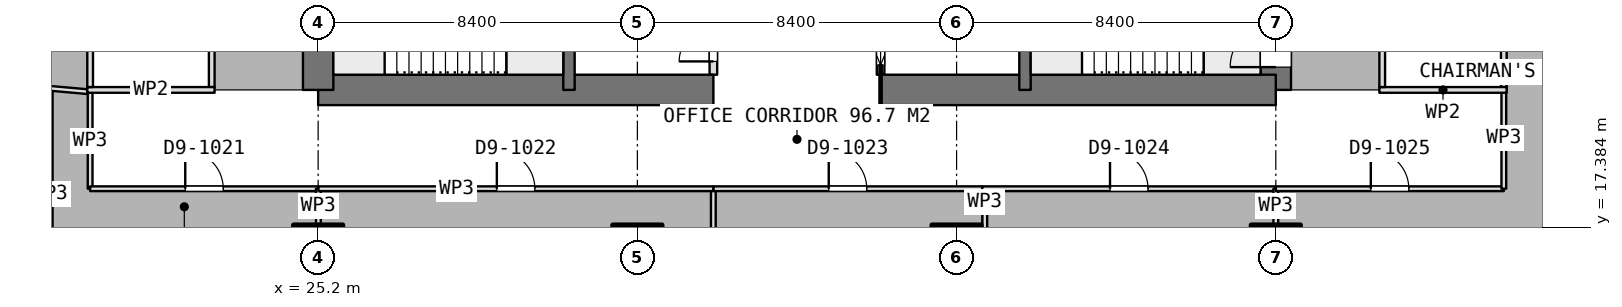
"""IFC4 building model, lengths in metres.
Left out: names, types, materials, properties, quantities, classifications, styles, units other than length and angle.
Written with IfcOpenShell. Run it as: python <this file> out.ifc"""

import sys

from ifc_helpers import new_model, si_unit, direction, frame, frame_2d, origin, origin_2d, place, context, subcontext, project, spatial, rectangle, extrude, element, fill, save


model = new_model("IFC4")
c1 = context("Model", 3, precision=1e-05, world=origin(), true_north=direction((0.0, 1.0)))
c2 = subcontext(c1, "Body", "Model", "MODEL_VIEW")
j1 = project(units=[si_unit("LENGTHUNIT", "METRE"), si_unit("PLANEANGLEUNIT", "RADIAN")], contexts=[c1])
p1 = place(None, origin())
s1 = spatial("IfcSite", under=j1, at=p1, CompositionType="ELEMENT")
p2 = place(p1, origin())
s2 = spatial("IfcBuilding", under=s1, at=p2, CompositionType="ELEMENT")
p3 = place(p2, frame((0.0, 0.0, 276.35)))
s3 = spatial("IfcBuildingStorey", under=s2, at=p3, CompositionType="ELEMENT", Elevation=276.35)
p4 = place(p3, frame((25.2, 21.0, 0.0), z_axis=(0.0, 0.0, 1.0), x_axis=(1.0, 0.0, 0.0)))
e1 = element("IfcWall", 1, at=p4, inside=s3, PredefinedType="SHEAR", context=c2, shape_type="SweptSolid", body=[
    extrude(rectangle(XDim=10.4, YDim=0.8, at=frame_2d((5.2, 0.0))), origin(), (0.0, 0.0, 1.0), 3.75),
])
p5 = place(p3, frame((40.0, 21.0, 0.0), z_axis=(0.0, 0.0, 1.0), x_axis=(1.0, 0.0, 0.0)))
e2 = element("IfcWall", 2, at=p5, inside=s3, PredefinedType="SHEAR", context=c2, shape_type="SweptSolid", body=[
    extrude(rectangle(XDim=10.4, YDim=0.8, at=frame_2d((5.2, 0.0))), origin(), (0.0, 0.0, 1.0), 3.75),
])
p6 = place(p3, frame((25.2, 21.0, 0.0), z_axis=(0.0, 0.0, 1.0), x_axis=(0.0, 1.0, 0.0)))
e3 = element("IfcWall", 3, at=p6, inside=s3, PredefinedType="SHEAR", context=c2, shape_type="SweptSolid", body=[
    extrude(rectangle(XDim=25.2, YDim=0.8, at=frame_2d((12.6, 0.0))), origin(), (0.0, 0.0, 1.0), 3.75),
])
p7 = place(p6, frame((7.8, 0.0, 0.0)))
e4 = element("IfcOpeningElement", 4, at=p7, cuts=e3, PredefinedType="OPENING", context=c2, shape_type="SweptSolid", body=[
    extrude(rectangle(XDim=1.2, YDim=2.1, at=frame_2d((0.6, 1.05))), frame((0.0, 0.41, 0.0), z_axis=(0.0, -1.0, 0.0), x_axis=(1.0, 0.0, 0.0)), (0.0, 0.0, 1.0), 0.82),
])
p8 = place(p6, frame((14.25, 0.0, 0.0)))
e5 = element("IfcOpeningElement", 5, at=p8, cuts=e3, PredefinedType="OPENING", context=c2, shape_type="SweptSolid", body=[
    extrude(rectangle(XDim=0.9, YDim=2.1, at=frame_2d((0.45, 1.05))), frame((0.0, 0.41, 0.0), z_axis=(0.0, -1.0, 0.0), x_axis=(1.0, 0.0, 0.0)), (0.0, 0.0, 1.0), 0.82),
])
p9 = place(p6, frame((16.85, 0.0, 0.0)))
e6 = element("IfcOpeningElement", 6, at=p9, cuts=e3, PredefinedType="OPENING", context=c2, shape_type="SweptSolid", body=[
    extrude(rectangle(XDim=0.9, YDim=2.1, at=frame_2d((0.45, 1.05))), frame((0.0, 0.41, 0.0), z_axis=(0.0, -1.0, 0.0), x_axis=(1.0, 0.0, 0.0)), (0.0, 0.0, 1.0), 0.82),
])
p10 = place(p6, frame((18.95, 0.0, 0.0)))
e7 = element("IfcOpeningElement", 7, at=p10, cuts=e3, PredefinedType="OPENING", context=c2, shape_type="SweptSolid", body=[
    extrude(rectangle(XDim=1.2, YDim=2.1, at=frame_2d((0.6, 1.05))), frame((0.0, 0.41, 0.0), z_axis=(0.0, -1.0, 0.0), x_axis=(1.0, 0.0, 0.0)), (0.0, 0.0, 1.0), 0.82),
])
p11 = place(p3, frame((50.4, 21.0, 0.0), z_axis=(0.0, 0.0, 1.0), x_axis=(0.0, 1.0, 0.0)))
e8 = element("IfcWall", 8, at=p11, inside=s3, PredefinedType="SHEAR", context=c2, shape_type="SweptSolid", body=[
    extrude(rectangle(XDim=25.2, YDim=0.8, at=frame_2d((12.6, 0.0))), origin(), (0.0, 0.0, 1.0), 3.75),
])
p12 = place(p11, frame((16.2, 0.0, 0.0)))
e9 = element("IfcOpeningElement", 9, at=p12, cuts=e8, PredefinedType="OPENING", context=c2, shape_type="SweptSolid", body=[
    extrude(rectangle(XDim=1.2, YDim=2.1, at=frame_2d((0.6, 1.05))), frame((0.0, 0.41, 0.0), z_axis=(0.0, -1.0, 0.0), x_axis=(1.0, 0.0, 0.0)), (0.0, 0.0, 1.0), 0.82),
])
p13 = place(p11, frame((10.05, 0.0, 0.0)))
e10 = element("IfcOpeningElement", 10, at=p13, cuts=e8, PredefinedType="OPENING", context=c2, shape_type="SweptSolid", body=[
    extrude(rectangle(XDim=0.9, YDim=2.1, at=frame_2d((0.45, 1.05))), frame((0.0, 0.41, 0.0), z_axis=(0.0, -1.0, 0.0), x_axis=(1.0, 0.0, 0.0)), (0.0, 0.0, 1.0), 0.82),
])
p14 = place(p11, frame((7.45, 0.0, 0.0)))
e11 = element("IfcOpeningElement", 11, at=p14, cuts=e8, PredefinedType="OPENING", context=c2, shape_type="SweptSolid", body=[
    extrude(rectangle(XDim=0.9, YDim=2.1, at=frame_2d((0.45, 1.05))), frame((0.0, 0.41, 0.0), z_axis=(0.0, -1.0, 0.0), x_axis=(1.0, 0.0, 0.0)), (0.0, 0.0, 1.0), 0.82),
])
p15 = place(p11, frame((0.6, 0.0, 0.0)))
e12 = element("IfcOpeningElement", 12, at=p15, cuts=e8, PredefinedType="OPENING", context=c2, shape_type="SweptSolid", body=[
    extrude(rectangle(XDim=1.2, YDim=2.1, at=frame_2d((0.6, 1.05))), frame((0.0, 0.41, 0.0), z_axis=(0.0, -1.0, 0.0), x_axis=(1.0, 0.0, 0.0)), (0.0, 0.0, 1.0), 0.82),
])
for number, where, z_axis, x_axis in (
    (13, (31.8, 21.0, 0.0), (0.0, 0.0, 1.0), (0.0, 1.0, 0.0)),
    (14, (43.8, 21.0, 0.0), (0.0, 0.0, 1.0), (0.0, 1.0, 0.0)),
):
    element("IfcWall", number, at=place(p3, frame(where, z_axis=z_axis, x_axis=x_axis)), inside=s3, PredefinedType="SHEAR", context=c2, shape_type="SweptSolid", body=[
        extrude(rectangle(XDim=25.2, YDim=0.3, at=frame_2d((12.6, 0.0))), origin(), (0.0, 0.0, 1.0), 3.75),
    ])
for number, where, z_axis, x_axis in (
    (15, (25.2, 16.8, 0.0), (0.0, 0.0, 1.0), (1.0, 0.0, 0.0)),
    (16, (33.6, 16.8, 0.0), (0.0, 0.0, 1.0), (1.0, 0.0, 0.0)),
    (17, (42.0, 16.8, 0.0), (0.0, 0.0, 1.0), (1.0, 0.0, 0.0)),
    (18, (50.4, 16.8, 0.0), (0.0, 0.0, 1.0), (1.0, 0.0, 0.0)),
):
    element("IfcColumn", number, at=place(p3, frame(where, z_axis=z_axis, x_axis=x_axis)), inside=s3, PredefinedType="COLUMN", context=c2, shape_type="SweptSolid", body=[
        extrude(rectangle(XDim=1.3, YDim=1.3, at=origin_2d()), origin(), (0.0, 0.0, 1.0), 3.75),
    ])
p16 = place(p3, frame((40.0, 21.4, 0.0), z_axis=(0.0, 0.0, 1.0), x_axis=(0.0, 1.0, 0.0)))
e19 = element("IfcWall", 19, at=p16, inside=s3, PredefinedType="PARTITIONING", context=c2, shape_type="SweptSolid", body=[
    extrude(rectangle(XDim=1.85, YDim=0.2, at=frame_2d((0.925, 0.0))), origin(), (0.0, 0.0, 1.0), 3.5),
])
p17 = place(p16, frame((0.25, 0.0, 0.0)))
e20 = element("IfcOpeningElement", 20, at=p17, cuts=e19, PredefinedType="OPENING", context=c2, shape_type="SweptSolid", body=[
    extrude(rectangle(XDim=1.1, YDim=2.1, at=frame_2d((0.55, 1.05))), frame((0.0, 0.11, 0.0), z_axis=(0.0, -1.0, 0.0), x_axis=(1.0, 0.0, 0.0)), (0.0, 0.0, 1.0), 0.22),
])
p18 = place(p3, frame((35.6, 21.4, 0.0), z_axis=(0.0, 0.0, 1.0), x_axis=(0.0, 1.0, 0.0)))
e21 = element("IfcWall", 21, at=p18, inside=s3, PredefinedType="PARTITIONING", context=c2, shape_type="SweptSolid", body=[
    extrude(rectangle(XDim=1.85, YDim=0.2, at=frame_2d((0.925, 0.0))), origin(), (0.0, 0.0, 1.0), 3.5),
])
p19 = place(p18, frame((0.35, 0.0, 0.0)))
e22 = element("IfcOpeningElement", 22, at=p19, cuts=e21, PredefinedType="OPENING", context=c2, shape_type="SweptSolid", body=[
    extrude(rectangle(XDim=0.9, YDim=2.1, at=frame_2d((0.45, 1.05))), frame((0.0, 0.11, 0.0), z_axis=(0.0, -1.0, 0.0), x_axis=(1.0, 0.0, 0.0)), (0.0, 0.0, 1.0), 0.22),
])
p20 = place(p3, frame((19.125, 21.0, 0.0), z_axis=(0.0, 0.0, 1.0), x_axis=(1.0, 0.0, 0.0)))
e23 = element("IfcWall", 23, at=p20, inside=s3, PredefinedType="PARTITIONING", context=c2, shape_type="SweptSolid", body=[
    extrude(rectangle(XDim=3.35, YDim=0.15, at=frame_2d((1.675, 0.0))), origin(), (0.0, 0.0, 1.0), 3.5),
])
p21 = place(p3, frame((19.2, 21.075, 0.0), z_axis=(0.0, 0.0, 1.0), x_axis=(0.0, 1.0, 0.0)))
e24 = element("IfcWall", 24, at=p21, inside=s3, PredefinedType="PARTITIONING", context=c2, shape_type="SweptSolid", body=[
    extrude(rectangle(XDim=6.85, YDim=0.15, at=frame_2d((3.425, 0.0))), origin(), (0.0, 0.0, 1.0), 3.5),
])
p22 = place(p3, frame((22.4, 21.075, 0.0), z_axis=(0.0, 0.0, 1.0), x_axis=(0.0, 1.0, 0.0)))
e25 = element("IfcWall", 25, at=p22, inside=s3, PredefinedType="PARTITIONING", context=c2, shape_type="SweptSolid", body=[
    extrude(rectangle(XDim=6.85, YDim=0.15, at=frame_2d((3.425, 0.0))), origin(), (0.0, 0.0, 1.0), 3.5),
])
p23 = place(p22, frame((2.925, 0.0, 0.0)))
e26 = element("IfcOpeningElement", 26, at=p23, cuts=e25, PredefinedType="OPENING", context=c2, shape_type="SweptSolid", body=[
    extrude(rectangle(XDim=1.0, YDim=2.1, at=frame_2d((0.5, 1.05))), frame((0.0, 0.085, 0.0), z_axis=(0.0, -1.0, 0.0), x_axis=(1.0, 0.0, 0.0)), (0.0, 0.0, 1.0), 0.17),
])
p24 = place(p3, frame((53.125, 21.0, 0.0), z_axis=(0.0, 0.0, 1.0), x_axis=(1.0, 0.0, 0.0)))
e27 = element("IfcWall", 27, at=p24, inside=s3, PredefinedType="PARTITIONING", context=c2, shape_type="SweptSolid", body=[
    extrude(rectangle(XDim=3.35, YDim=0.15, at=frame_2d((1.675, 0.0))), origin(), (0.0, 0.0, 1.0), 3.5),
])
p25 = place(p3, frame((53.2, 21.075, 0.0), z_axis=(0.0, 0.0, 1.0), x_axis=(0.0, 1.0, 0.0)))
e28 = element("IfcWall", 28, at=p25, inside=s3, PredefinedType="PARTITIONING", context=c2, shape_type="SweptSolid", body=[
    extrude(rectangle(XDim=6.85, YDim=0.15, at=frame_2d((3.425, 0.0))), origin(), (0.0, 0.0, 1.0), 3.5),
])
p26 = place(p25, frame((2.925, 0.0, 0.0)))
e29 = element("IfcOpeningElement", 29, at=p26, cuts=e28, PredefinedType="OPENING", context=c2, shape_type="SweptSolid", body=[
    extrude(rectangle(XDim=1.0, YDim=2.1, at=frame_2d((0.5, 1.05))), frame((0.0, 0.085, 0.0), z_axis=(0.0, -1.0, 0.0), x_axis=(1.0, 0.0, 0.0)), (0.0, 0.0, 1.0), 0.17),
])
p27 = place(p3, frame((56.4, 21.075, 0.0), z_axis=(0.0, 0.0, 1.0), x_axis=(0.0, 1.0, 0.0)))
e30 = element("IfcWall", 30, at=p27, inside=s3, PredefinedType="PARTITIONING", context=c2, shape_type="SweptSolid", body=[
    extrude(rectangle(XDim=6.85, YDim=0.15, at=frame_2d((3.425, 0.0))), origin(), (0.0, 0.0, 1.0), 3.5),
])
p28 = place(p3, frame((35.599, 15.119, 0.0), z_axis=(0.0, 0.0, 1.0), x_axis=(0.0, 1.0, 0.0)))
e31 = element("IfcWall", 31, at=p28, inside=s3, PredefinedType="PARTITIONING", context=c2, shape_type="SweptSolid", body=[
    extrude(rectangle(XDim=3.281, YDim=0.125, at=frame_2d((1.641, 0.0))), origin(), (0.0, 0.0, 1.0), 3.5),
])
p29 = place(p3, frame((35.599, 18.4, 0.0), z_axis=(0.0, 0.0, 1.0), x_axis=(1.0, 0.0, 0.0)))
e32 = element("IfcWall", 32, at=p29, inside=s3, PredefinedType="PARTITIONING", context=c2, shape_type="SweptSolid", body=[
    extrude(rectangle(XDim=7.074, YDim=0.125, at=frame_2d((3.537, 0.0))), origin(), (0.0, 0.0, 1.0), 3.5),
])
p30 = place(p29, frame((3.037, 0.0, 0.0)))
e33 = element("IfcOpeningElement", 33, at=p30, cuts=e32, PredefinedType="OPENING", context=c2, shape_type="SweptSolid", body=[
    extrude(rectangle(XDim=1.0, YDim=2.1, at=frame_2d((0.5, 1.05))), frame((0.0, 0.073, 0.0), z_axis=(0.0, -1.0, 0.0), x_axis=(1.0, 0.0, 0.0)), (0.0, 0.0, 1.0), 0.145),
])
p31 = place(p3, frame((42.742, 18.337, 0.0), z_axis=(0.0, 0.0, 1.0), x_axis=(0.0, -1.0, 0.0)))
e34 = element("IfcWall", 34, at=p31, inside=s3, PredefinedType="PARTITIONING", context=c2, shape_type="SweptSolid", body=[
    extrude(rectangle(XDim=2.799, YDim=0.125, at=frame_2d((1.399, 0.0))), origin(), (0.0, 0.0, 1.0), 3.5),
])
p32 = place(p3, frame((42.674, 18.4, 0.0), z_axis=(0.0, 0.0, 1.0), x_axis=(1.0, 0.0, 0.0)))
e35 = element("IfcWall", 35, at=p32, inside=s3, PredefinedType="PARTITIONING", context=c2, shape_type="SweptSolid", body=[
    extrude(rectangle(XDim=7.726, YDim=0.125, at=frame_2d((3.863, 0.0))), origin(), (0.0, 0.0, 1.0), 3.5),
])
p33 = place(p32, frame((3.363, 0.0, 0.0)))
e36 = element("IfcOpeningElement", 36, at=p33, cuts=e35, PredefinedType="OPENING", context=c2, shape_type="SweptSolid", body=[
    extrude(rectangle(XDim=1.0, YDim=2.1, at=frame_2d((0.5, 1.05))), frame((0.0, 0.073, 0.0), z_axis=(0.0, -1.0, 0.0), x_axis=(1.0, 0.0, 0.0)), (0.0, 0.0, 1.0), 0.145),
])
p34 = place(p3, frame((50.4, 18.4, 0.0), z_axis=(0.0, 0.0, 1.0), x_axis=(0.0, -1.0, 0.0)))
e37 = element("IfcWall", 37, at=p34, inside=s3, PredefinedType="PARTITIONING", context=c2, shape_type="SweptSolid", body=[
    extrude(rectangle(XDim=0.93, YDim=0.125, at=frame_2d((0.465, 0.0))), origin(), (0.0, 0.0, 1.0), 3.5),
])
p35 = place(p3, frame((50.401, 18.4, 0.0), z_axis=(0.0, 0.0, 1.0), x_axis=(1.0, 0.0, 0.0)))
e38 = element("IfcWall", 38, at=p35, inside=s3, PredefinedType="PARTITIONING", context=c2, shape_type="SweptSolid", body=[
    extrude(rectangle(XDim=5.999, YDim=0.125, at=frame_2d((3.0, 0.0))), origin(), (0.0, 0.0, 1.0), 3.5),
])
p36 = place(p35, frame((2.499, 0.0, 0.0)))
e39 = element("IfcOpeningElement", 39, at=p36, cuts=e38, PredefinedType="OPENING", context=c2, shape_type="SweptSolid", body=[
    extrude(rectangle(XDim=1.0, YDim=2.1, at=frame_2d((0.5, 1.05))), frame((0.0, 0.073, 0.0), z_axis=(0.0, -1.0, 0.0), x_axis=(1.0, 0.0, 0.0)), (0.0, 0.0, 1.0), 0.145),
])
p37 = place(p3, frame((56.4, 18.4, 0.0), z_axis=(0.0, 0.0, 1.0), x_axis=(0.0, 1.0, 0.0)))
e40 = element("IfcWall", 40, at=p37, inside=s3, PredefinedType="PARTITIONING", context=c2, shape_type="SweptSolid", body=[
    extrude(rectangle(XDim=2.675, YDim=0.125, at=frame_2d((1.337, 0.0))), origin(), (0.0, 0.0, 1.0), 3.5),
])
p38 = place(p3, frame((18.149, 21.041, 0.0), z_axis=(0.0, 0.0, 1.0), x_axis=(0.0, -1.0, 0.0)))
e41 = element("IfcWall", 41, at=p38, inside=s3, PredefinedType="PARTITIONING", context=c2, shape_type="SweptSolid", body=[
    extrude(rectangle(XDim=5.541, YDim=0.125, at=frame_2d((2.771, 0.0))), origin(), (0.0, 0.0, 1.0), 3.5),
])
p39 = place(p3, frame((18.15, 21.041, 0.0), z_axis=(0.0, 0.0, 1.0), x_axis=(0.996138836376, -0.087791905459, 0.0)))
e42 = element("IfcWall", 42, at=p39, inside=s3, PredefinedType="PARTITIONING", context=c2, shape_type="SweptSolid", body=[
    extrude(rectangle(XDim=0.979, YDim=0.125, at=frame_2d((0.489, 0.0))), origin(), (0.0, 0.0, 1.0), 3.5),
])
p40 = place(p3, frame((19.2, 20.925, 0.0), z_axis=(0.0, 0.0, 1.0), x_axis=(0.0, -1.0, 0.0)))
e43 = element("IfcWall", 43, at=p40, inside=s3, PredefinedType="PARTITIONING", context=c2, shape_type="SweptSolid", body=[
    extrude(rectangle(XDim=2.525, YDim=0.125, at=frame_2d((1.263, 0.0))), origin(), (0.0, 0.0, 1.0), 3.5),
])
p41 = place(p3, frame((19.2, 18.4, 0.0), z_axis=(0.0, 0.0, 1.0), x_axis=(1.0, 0.0, 0.0)))
e44 = element("IfcWall", 44, at=p41, inside=s3, PredefinedType="PARTITIONING", context=c2, shape_type="SweptSolid", body=[
    extrude(rectangle(XDim=6.006, YDim=0.125, at=frame_2d((3.003, 0.0))), origin(), (0.0, 0.0, 1.0), 3.5),
])
p42 = place(p41, frame((2.503, 0.0, 0.0)))
e45 = element("IfcOpeningElement", 45, at=p42, cuts=e44, PredefinedType="OPENING", context=c2, shape_type="SweptSolid", body=[
    extrude(rectangle(XDim=1.0, YDim=2.1, at=frame_2d((0.5, 1.05))), frame((0.0, 0.073, 0.0), z_axis=(0.0, -1.0, 0.0), x_axis=(1.0, 0.0, 0.0)), (0.0, 0.0, 1.0), 0.145),
])
p43 = place(p3, frame((25.206, 18.4, 0.0), z_axis=(0.0, 0.0, 1.0), x_axis=(0.0, -1.0, 0.0)))
e46 = element("IfcWall", 46, at=p43, inside=s3, PredefinedType="PARTITIONING", context=c2, shape_type="SweptSolid", body=[
    extrude(rectangle(XDim=0.93, YDim=0.125, at=frame_2d((0.465, 0.0))), origin(), (0.0, 0.0, 1.0), 3.5),
])
p44 = place(p3, frame((25.207, 18.4, 0.0), z_axis=(0.0, 0.0, 1.0), x_axis=(1.0, 0.0, 0.0)))
e47 = element("IfcWall", 47, at=p44, inside=s3, PredefinedType="PARTITIONING", context=c2, shape_type="SweptSolid", body=[
    extrude(rectangle(XDim=10.391, YDim=0.125, at=frame_2d((5.195, 0.0))), origin(), (0.0, 0.0, 1.0), 3.5),
])
p45 = place(p44, frame((4.695, 0.0, 0.0)))
e48 = element("IfcOpeningElement", 48, at=p45, cuts=e47, PredefinedType="OPENING", context=c2, shape_type="SweptSolid", body=[
    extrude(rectangle(XDim=1.0, YDim=2.1, at=frame_2d((0.5, 1.05))), frame((0.0, 0.073, 0.0), z_axis=(0.0, -1.0, 0.0), x_axis=(1.0, 0.0, 0.0)), (0.0, 0.0, 1.0), 0.145),
])
p46 = place(p17, origin())
e49 = element("IfcDoor", 49, at=p46, inside=s3, OperationType="SLIDING_TO_LEFT", PredefinedType="DOOR", context=c2, shape_type="SweptSolid", body=[
    extrude(rectangle(XDim=1.1, YDim=2.1, at=frame_2d((0.55, 1.05))), frame((0.0, 0.025, 0.0), z_axis=(0.0, -1.0, 0.0), x_axis=(1.0, 0.0, 0.0)), (0.0, 0.0, 1.0), 0.05),
])
fill(e20, e49)
p47 = place(p19, origin())
e50 = element("IfcDoor", 50, at=p47, inside=s3, OperationType="SINGLE_SWING_LEFT", PredefinedType="DOOR", context=c2, shape_type="SweptSolid", body=[
    extrude(rectangle(XDim=0.9, YDim=2.1, at=frame_2d((0.45, 1.05))), frame((0.0, 0.025, 0.0), z_axis=(0.0, -1.0, 0.0), x_axis=(1.0, 0.0, 0.0)), (0.0, 0.0, 1.0), 0.05),
])
fill(e22, e50)
p48 = place(p30, origin())
e51 = element("IfcDoor", 51, at=p48, inside=s3, OperationType="SINGLE_SWING_LEFT", PredefinedType="DOOR", context=c2, shape_type="SweptSolid", body=[
    extrude(rectangle(XDim=1.0, YDim=2.1, at=frame_2d((0.5, 1.05))), frame((0.0, 0.025, 0.0), z_axis=(0.0, -1.0, 0.0), x_axis=(1.0, 0.0, 0.0)), (0.0, 0.0, 1.0), 0.05),
])
fill(e33, e51)
p49 = place(p33, origin())
e52 = element("IfcDoor", 52, at=p49, inside=s3, OperationType="SINGLE_SWING_LEFT", PredefinedType="DOOR", context=c2, shape_type="SweptSolid", body=[
    extrude(rectangle(XDim=1.0, YDim=2.1, at=frame_2d((0.5, 1.05))), frame((0.0, 0.025, 0.0), z_axis=(0.0, -1.0, 0.0), x_axis=(1.0, 0.0, 0.0)), (0.0, 0.0, 1.0), 0.05),
])
fill(e36, e52)
p50 = place(p36, origin())
e53 = element("IfcDoor", 53, at=p50, inside=s3, OperationType="SINGLE_SWING_LEFT", PredefinedType="DOOR", context=c2, shape_type="SweptSolid", body=[
    extrude(rectangle(XDim=1.0, YDim=2.1, at=frame_2d((0.5, 1.05))), frame((0.0, 0.025, 0.0), z_axis=(0.0, -1.0, 0.0), x_axis=(1.0, 0.0, 0.0)), (0.0, 0.0, 1.0), 0.05),
])
fill(e39, e53)
p51 = place(p42, origin())
e54 = element("IfcDoor", 54, at=p51, inside=s3, OperationType="SINGLE_SWING_LEFT", PredefinedType="DOOR", context=c2, shape_type="SweptSolid", body=[
    extrude(rectangle(XDim=1.0, YDim=2.1, at=frame_2d((0.5, 1.05))), frame((0.0, 0.025, 0.0), z_axis=(0.0, -1.0, 0.0), x_axis=(1.0, 0.0, 0.0)), (0.0, 0.0, 1.0), 0.05),
])
fill(e45, e54)
p52 = place(p45, origin())
e55 = element("IfcDoor", 55, at=p52, inside=s3, OperationType="SINGLE_SWING_LEFT", PredefinedType="DOOR", context=c2, shape_type="SweptSolid", body=[
    extrude(rectangle(XDim=1.0, YDim=2.1, at=frame_2d((0.5, 1.05))), frame((0.0, 0.025, 0.0), z_axis=(0.0, -1.0, 0.0), x_axis=(1.0, 0.0, 0.0)), (0.0, 0.0, 1.0), 0.05),
])
fill(e48, e55)
p53 = place(p15, origin())
e56 = element("IfcDoor", 56, at=p53, inside=s3, OperationType="SINGLE_SWING_RIGHT", PredefinedType="DOOR", context=c2, shape_type="SweptSolid", body=[
    extrude(rectangle(XDim=1.2, YDim=2.1, at=frame_2d((0.6, 1.05))), frame((0.0, 0.025, 0.0), z_axis=(0.0, -1.0, 0.0), x_axis=(1.0, 0.0, 0.0)), (0.0, 0.0, 1.0), 0.05),
])
fill(e12, e56)
save(model, sys.argv[1])
